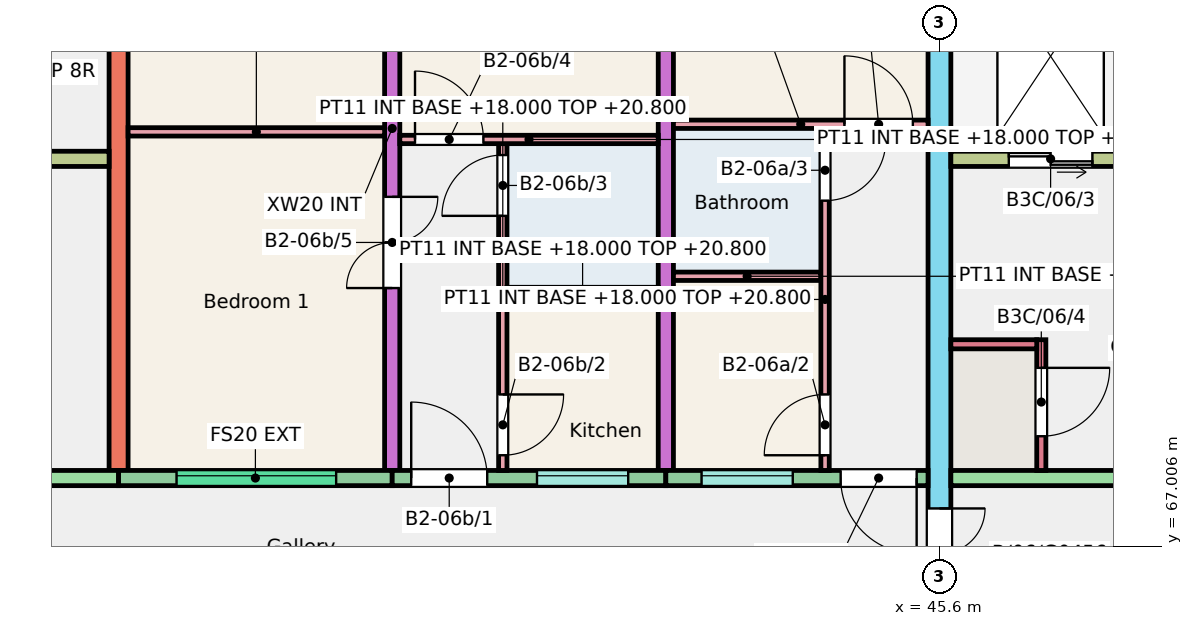
"""IFC4 building model, lengths in metres.
Left out: names, types, materials, properties, quantities, classifications, styles, units other than length and angle.
Written with IfcOpenShell. Run it as: python <this file> out.ifc"""

import sys

from ifc_helpers import new_model, si_unit, direction, frame, frame_2d, origin, place, context, subcontext, project, spatial, rectangle, extrude, element, fill, save


model = new_model("IFC4")
c1 = context("Model", 3, precision=1e-05, world=origin(), true_north=direction((0.0, 1.0)))
c2 = subcontext(c1, "Body", "Model", "MODEL_VIEW")
j1 = project(units=[si_unit("LENGTHUNIT", "METRE"), si_unit("PLANEANGLEUNIT", "RADIAN")], contexts=[c1])
p1 = place(None, origin())
s1 = spatial("IfcSite", under=j1, at=p1, CompositionType="ELEMENT")
p2 = place(p1, origin())
s2 = spatial("IfcBuilding", under=s1, at=p2, CompositionType="ELEMENT")
p3 = place(p2, frame((0.0, 0.0, 18.0)))
s3 = spatial("IfcBuildingStorey", under=s2, at=p3, CompositionType="ELEMENT", Elevation=18.0)
p4 = place(p3, frame((34.8, 68.0, 0.0), z_axis=(0.0, 0.0, 1.0), x_axis=(0.0, 1.0, 0.0)))
e1 = element("IfcWall", 1, at=p4, inside=s3, PredefinedType="SHEAR", context=c2, shape_type="SweptSolid", body=[
    extrude(rectangle(XDim=9.0, YDim=0.25, at=frame_2d((4.5, 0.0))), origin(), (0.0, 0.0, 1.0), 3.0),
])
p5 = place(p3, frame((38.4, 68.0, 0.0), z_axis=(0.0, 0.0, 1.0), x_axis=(0.0, 1.0, 0.0)))
e2 = element("IfcWall", 2, at=p5, inside=s3, PredefinedType="SHEAR", context=c2, shape_type="SweptSolid", body=[
    extrude(rectangle(XDim=9.0, YDim=0.2, at=frame_2d((4.5, 0.0))), origin(), (0.0, 0.0, 1.0), 3.0),
])
p6 = place(p5, frame((2.4, 0.0, 0.0)))
e3 = element("IfcOpeningElement", 3, at=p6, cuts=e2, PredefinedType="OPENING", context=c2, shape_type="SweptSolid", body=[
    extrude(rectangle(XDim=1.2, YDim=2.1, at=frame_2d((0.6, 1.05))), frame((0.0, 0.11, 0.0), z_axis=(0.0, -1.0, 0.0), x_axis=(1.0, 0.0, 0.0)), (0.0, 0.0, 1.0), 0.22),
])
p7 = place(p5, frame((6.4, 0.0, 0.0)))
e4 = element("IfcOpeningElement", 4, at=p7, cuts=e2, PredefinedType="OPENING", context=c2, shape_type="SweptSolid", body=[
    extrude(rectangle(XDim=1.2, YDim=2.1, at=frame_2d((0.6, 1.05))), frame((0.0, 0.11, 0.0), z_axis=(0.0, -1.0, 0.0), x_axis=(1.0, 0.0, 0.0)), (0.0, 0.0, 1.0), 0.22),
])
p8 = place(p3, frame((42.0, 68.0, 0.0), z_axis=(0.0, 0.0, 1.0), x_axis=(0.0, 1.0, 0.0)))
e5 = element("IfcWall", 5, at=p8, inside=s3, PredefinedType="SHEAR", context=c2, shape_type="SweptSolid", body=[
    extrude(rectangle(XDim=9.0, YDim=0.2, at=frame_2d((4.5, 0.0))), origin(), (0.0, 0.0, 1.0), 3.0),
])
p9 = place(p3, frame((45.6, 66.0, 0.0), z_axis=(0.0, 0.0, 1.0), x_axis=(0.0, 1.0, 0.0)))
e6 = element("IfcWall", 6, at=p9, inside=s3, PredefinedType="SHEAR", context=c2, shape_type="SweptSolid", body=[
    extrude(rectangle(XDim=11.0, YDim=0.3, at=frame_2d((5.5, 0.0))), origin(), (0.0, 0.0, 1.0), 3.0),
])
p10 = place(p9, frame((0.3, 0.0, 0.0)))
e7 = element("IfcOpeningElement", 7, at=p10, cuts=e6, PredefinedType="OPENING", context=c2, shape_type="SweptSolid", body=[
    extrude(rectangle(XDim=1.2, YDim=2.1, at=frame_2d((0.6, 1.05))), frame((0.0, 0.16, 0.0), z_axis=(0.0, -1.0, 0.0), x_axis=(1.0, 0.0, 0.0)), (0.0, 0.0, 1.0), 0.32),
])
p11 = place(p3, frame((28.95, 67.9, 0.0), z_axis=(0.0, 0.0, 1.0), x_axis=(1.0, 0.0, 0.0)))
e8 = element("IfcWall", 8, at=p11, inside=s3, PredefinedType="SHEAR", context=c2, shape_type="SweptSolid", body=[
    extrude(rectangle(XDim=5.85, YDim=0.2, at=frame_2d((2.925, 0.0))), origin(), (0.0, 0.0, 1.0), 3.0),
])
p12 = place(p11, frame((2.312, 0.0, 0.0)))
e9 = element("IfcOpeningElement", 9, at=p12, cuts=e8, PredefinedType="OPENING", context=c2, shape_type="SweptSolid", body=[
    extrude(rectangle(XDim=1.1, YDim=2.1, at=frame_2d((0.55, 1.05))), frame((0.0, 0.11, 0.0), z_axis=(0.0, -1.0, 0.0), x_axis=(1.0, 0.0, 0.0)), (0.0, 0.0, 1.0), 0.22),
])
p13 = place(p3, frame((28.95, 72.1, 0.0), z_axis=(0.0, 0.0, 1.0), x_axis=(1.0, 0.0, 0.0)))
e10 = element("IfcWall", 10, at=p13, inside=s3, PredefinedType="SHEAR", context=c2, shape_type="SweptSolid", body=[
    extrude(rectangle(XDim=5.725, YDim=0.2, at=frame_2d((2.863, 0.0))), origin(), (0.0, 0.0, 1.0), 3.0),
])
p14 = place(p13, frame((3.775, 0.0, 0.0)))
e11 = element("IfcOpeningElement", 11, at=p14, cuts=e10, PredefinedType="OPENING", context=c2, shape_type="SweptSolid", body=[
    extrude(rectangle(XDim=1.0, YDim=2.1, at=frame_2d((0.5, 1.05))), frame((0.0, 0.11, 0.0), z_axis=(0.0, -1.0, 0.0), x_axis=(1.0, 0.0, 0.0)), (0.0, 0.0, 1.0), 0.22),
])
p15 = place(p13, frame((0.762, 0.0, 0.0)))
e12 = element("IfcOpeningElement", 12, at=p15, cuts=e10, PredefinedType="OPENING", context=c2, shape_type="SweptSolid", body=[
    extrude(rectangle(XDim=1.1, YDim=2.1, at=frame_2d((0.55, 1.05))), frame((0.0, 0.11, 0.0), z_axis=(0.0, -1.0, 0.0), x_axis=(1.0, 0.0, 0.0)), (0.0, 0.0, 1.0), 0.22),
])
p16 = place(p3, frame((34.8, 67.9, 0.0), z_axis=(0.0, 0.0, 1.0), x_axis=(1.0, 0.0, 0.0)))
e13 = element("IfcWall", 13, at=p16, inside=s3, PredefinedType="SOLIDWALL", context=c2, shape_type="SweptSolid", body=[
    extrude(rectangle(XDim=3.6, YDim=0.2, at=frame_2d((1.8, 0.0))), origin(), (0.0, 0.0, 1.0), 3.0),
])
p17 = place(p16, frame((0.762, 0.0, 1.2)))
e14 = element("IfcOpeningElement", 14, at=p17, cuts=e13, PredefinedType="OPENING", context=c2, shape_type="SweptSolid", body=[
    extrude(rectangle(XDim=2.1, YDim=1.2, at=frame_2d((1.05, 0.6))), frame((0.0, 0.11, 0.0), z_axis=(0.0, -1.0, 0.0), x_axis=(1.0, 0.0, 0.0)), (0.0, 0.0, 1.0), 0.22),
])
p18 = place(p3, frame((38.4, 67.9, 0.0), z_axis=(0.0, 0.0, 1.0), x_axis=(1.0, 0.0, 0.0)))
e15 = element("IfcWall", 15, at=p18, inside=s3, PredefinedType="SOLIDWALL", context=c2, shape_type="SweptSolid", body=[
    extrude(rectangle(XDim=3.6, YDim=0.2, at=frame_2d((1.8, 0.0))), origin(), (0.0, 0.0, 1.0), 3.0),
])
p19 = place(p18, frame((1.905, 0.0, 1.1)))
e16 = element("IfcOpeningElement", 16, at=p19, cuts=e15, PredefinedType="OPENING", context=c2, shape_type="SweptSolid", body=[
    extrude(rectangle(XDim=1.2, YDim=1.3, at=frame_2d((0.6, 0.65))), frame((0.0, 0.11, 0.0), z_axis=(0.0, -1.0, 0.0), x_axis=(1.0, 0.0, 0.0)), (0.0, 0.0, 1.0), 0.22),
])
p20 = place(p18, frame((0.25, 0.0, 0.0)))
e17 = element("IfcOpeningElement", 17, at=p20, cuts=e15, PredefinedType="OPENING", context=c2, shape_type="SweptSolid", body=[
    extrude(rectangle(XDim=1.0, YDim=2.1, at=frame_2d((0.5, 1.05))), frame((0.0, 0.11, 0.0), z_axis=(0.0, -1.0, 0.0), x_axis=(1.0, 0.0, 0.0)), (0.0, 0.0, 1.0), 0.22),
])
p21 = place(p3, frame((42.0, 67.9, 0.0), z_axis=(0.0, 0.0, 1.0), x_axis=(1.0, 0.0, 0.0)))
e18 = element("IfcWall", 18, at=p21, inside=s3, PredefinedType="SOLIDWALL", context=c2, shape_type="SweptSolid", body=[
    extrude(rectangle(XDim=3.45, YDim=0.2, at=frame_2d((1.725, 0.0))), origin(), (0.0, 0.0, 1.0), 3.0),
])
p22 = place(p21, frame((0.47, 0.0, 1.1)))
e19 = element("IfcOpeningElement", 19, at=p22, cuts=e18, PredefinedType="OPENING", context=c2, shape_type="SweptSolid", body=[
    extrude(rectangle(XDim=1.2, YDim=1.3, at=frame_2d((0.6, 0.65))), frame((0.0, 0.11, 0.0), z_axis=(0.0, -1.0, 0.0), x_axis=(1.0, 0.0, 0.0)), (0.0, 0.0, 1.0), 0.22),
])
p23 = place(p21, frame((2.3, 0.0, 0.0)))
e20 = element("IfcOpeningElement", 20, at=p23, cuts=e18, PredefinedType="OPENING", context=c2, shape_type="SweptSolid", body=[
    extrude(rectangle(XDim=1.0, YDim=2.1, at=frame_2d((0.5, 1.05))), frame((0.0, 0.11, 0.0), z_axis=(0.0, -1.0, 0.0), x_axis=(1.0, 0.0, 0.0)), (0.0, 0.0, 1.0), 0.22),
])
p24 = place(p3, frame((45.75, 67.9, 0.0), z_axis=(0.0, 0.0, 1.0), x_axis=(1.0, 0.0, 0.0)))
e21 = element("IfcWall", 21, at=p24, inside=s3, PredefinedType="SHEAR", context=c2, shape_type="SweptSolid", body=[
    extrude(rectangle(XDim=5.85, YDim=0.2, at=frame_2d((2.925, 0.0))), origin(), (0.0, 0.0, 1.0), 3.0),
])
p25 = place(p24, frame((2.312, 0.0, 0.0)))
e22 = element("IfcOpeningElement", 22, at=p25, cuts=e21, PredefinedType="OPENING", context=c2, shape_type="SweptSolid", body=[
    extrude(rectangle(XDim=1.1, YDim=2.1, at=frame_2d((0.55, 1.05))), frame((0.0, 0.11, 0.0), z_axis=(0.0, -1.0, 0.0), x_axis=(1.0, 0.0, 0.0)), (0.0, 0.0, 1.0), 0.22),
])
p26 = place(p3, frame((45.75, 72.1, 0.0), z_axis=(0.0, 0.0, 1.0), x_axis=(1.0, 0.0, 0.0)))
e23 = element("IfcWall", 23, at=p26, inside=s3, PredefinedType="SHEAR", context=c2, shape_type="SweptSolid", body=[
    extrude(rectangle(XDim=5.725, YDim=0.2, at=frame_2d((2.863, 0.0))), origin(), (0.0, 0.0, 1.0), 3.0),
])
p27 = place(p26, frame((3.775, 0.0, 0.0)))
e24 = element("IfcOpeningElement", 24, at=p27, cuts=e23, PredefinedType="OPENING", context=c2, shape_type="SweptSolid", body=[
    extrude(rectangle(XDim=1.0, YDim=2.1, at=frame_2d((0.5, 1.05))), frame((0.0, 0.11, 0.0), z_axis=(0.0, -1.0, 0.0), x_axis=(1.0, 0.0, 0.0)), (0.0, 0.0, 1.0), 0.22),
])
p28 = place(p26, frame((0.762, 0.0, 0.0)))
e25 = element("IfcOpeningElement", 25, at=p28, cuts=e23, PredefinedType="OPENING", context=c2, shape_type="SweptSolid", body=[
    extrude(rectangle(XDim=1.1, YDim=2.1, at=frame_2d((0.55, 1.05))), frame((0.0, 0.11, 0.0), z_axis=(0.0, -1.0, 0.0), x_axis=(1.0, 0.0, 0.0)), (0.0, 0.0, 1.0), 0.22),
])
p29 = place(p3, frame((46.94, 68.0, 0.0), z_axis=(0.0, 0.0, 1.0), x_axis=(0.0, 1.0, 0.0)))
e26 = element("IfcWall", 26, at=p29, inside=s3, PredefinedType="SHEAR", context=c2, shape_type="SweptSolid", body=[
    extrude(rectangle(XDim=1.72, YDim=0.12, at=frame_2d((0.86, 0.0))), origin(), (0.0, 0.0, 1.0), 3.0),
])
p30 = place(p29, frame((0.45, 0.0, 0.0)))
e27 = element("IfcOpeningElement", 27, at=p30, cuts=e26, PredefinedType="OPENING", context=c2, shape_type="SweptSolid", body=[
    extrude(rectangle(XDim=0.9, YDim=2.1, at=frame_2d((0.45, 1.05))), frame((0.0, 0.07, 0.0), z_axis=(0.0, -1.0, 0.0), x_axis=(1.0, 0.0, 0.0)), (0.0, 0.0, 1.0), 0.14),
])
p31 = place(p3, frame((45.75, 69.66, 0.0), z_axis=(0.0, 0.0, 1.0), x_axis=(1.0, 0.0, 0.0)))
e28 = element("IfcWall", 28, at=p31, inside=s3, PredefinedType="SHEAR", context=c2, shape_type="SweptSolid", body=[
    extrude(rectangle(XDim=1.13, YDim=0.12, at=frame_2d((0.565, 0.0))), origin(), (0.0, 0.0, 1.0), 3.0),
])
p32 = place(p3, frame((42.1, 70.555, 0.0), z_axis=(0.0, 0.0, 1.0), x_axis=(1.0, 0.0, 0.0)))
e29 = element("IfcWall", 29, at=p32, inside=s3, PredefinedType="PARTITIONING", context=c2, shape_type="SweptSolid", body=[
    extrude(rectangle(XDim=1.94, YDim=0.11, at=frame_2d((0.97, 0.0))), origin(), (0.0, 0.0, 1.0), 2.8),
])
p33 = place(p3, frame((44.095, 68.0, 0.0), z_axis=(0.0, 0.0, 1.0), x_axis=(0.0, 1.0, 0.0)))
e30 = element("IfcWall", 30, at=p33, inside=s3, PredefinedType="PARTITIONING", context=c2, shape_type="SweptSolid", body=[
    extrude(rectangle(XDim=4.5, YDim=0.11, at=frame_2d((2.25, 0.0))), origin(), (0.0, 0.0, 1.0), 2.8),
])
p34 = place(p33, frame((0.2, 0.0, 0.0)))
e31 = element("IfcOpeningElement", 31, at=p34, cuts=e30, PredefinedType="OPENING", context=c2, shape_type="SweptSolid", body=[
    extrude(rectangle(XDim=0.8, YDim=2.1, at=frame_2d((0.4, 1.05))), frame((0.0, 0.065, 0.0), z_axis=(0.0, -1.0, 0.0), x_axis=(1.0, 0.0, 0.0)), (0.0, 0.0, 1.0), 0.13),
])
p35 = place(p33, frame((3.55, 0.0, 0.0)))
e32 = element("IfcOpeningElement", 32, at=p35, cuts=e30, PredefinedType="OPENING", context=c2, shape_type="SweptSolid", body=[
    extrude(rectangle(XDim=0.8, YDim=2.1, at=frame_2d((0.4, 1.05))), frame((0.0, 0.065, 0.0), z_axis=(0.0, -1.0, 0.0), x_axis=(1.0, 0.0, 0.0)), (0.0, 0.0, 1.0), 0.13),
])
p36 = place(p3, frame((42.1, 72.555, 0.0), z_axis=(0.0, 0.0, 1.0), x_axis=(1.0, 0.0, 0.0)))
e33 = element("IfcWall", 33, at=p36, inside=s3, PredefinedType="PARTITIONING", context=c2, shape_type="SweptSolid", body=[
    extrude(rectangle(XDim=3.35, YDim=0.11, at=frame_2d((1.675, 0.0))), origin(), (0.0, 0.0, 1.0), 2.8),
])
p37 = place(p36, frame((2.25, 0.0, 0.0)))
e34 = element("IfcOpeningElement", 34, at=p37, cuts=e33, PredefinedType="OPENING", context=c2, shape_type="SweptSolid", body=[
    extrude(rectangle(XDim=0.9, YDim=2.1, at=frame_2d((0.45, 1.05))), frame((0.0, 0.065, 0.0), z_axis=(0.0, -1.0, 0.0), x_axis=(1.0, 0.0, 0.0)), (0.0, 0.0, 1.0), 0.13),
])
p38 = place(p3, frame((39.855, 68.0, 0.0), z_axis=(0.0, 0.0, 1.0), x_axis=(0.0, 1.0, 0.0)))
e35 = element("IfcWall", 35, at=p38, inside=s3, PredefinedType="PARTITIONING", context=c2, shape_type="SweptSolid", body=[
    extrude(rectangle(XDim=4.3, YDim=0.11, at=frame_2d((2.15, 0.0))), origin(), (0.0, 0.0, 1.0), 2.8),
])
p39 = place(p38, frame((0.2, 0.0, 0.0)))
e36 = element("IfcOpeningElement", 36, at=p39, cuts=e35, PredefinedType="OPENING", context=c2, shape_type="SweptSolid", body=[
    extrude(rectangle(XDim=0.8, YDim=2.1, at=frame_2d((0.4, 1.05))), frame((0.0, 0.065, 0.0), z_axis=(0.0, -1.0, 0.0), x_axis=(1.0, 0.0, 0.0)), (0.0, 0.0, 1.0), 0.13),
])
p40 = place(p38, frame((3.35, 0.0, 0.0)))
e37 = element("IfcOpeningElement", 37, at=p40, cuts=e35, PredefinedType="OPENING", context=c2, shape_type="SweptSolid", body=[
    extrude(rectangle(XDim=0.8, YDim=2.1, at=frame_2d((0.4, 1.05))), frame((0.0, 0.065, 0.0), z_axis=(0.0, -1.0, 0.0), x_axis=(1.0, 0.0, 0.0)), (0.0, 0.0, 1.0), 0.13),
])
p41 = place(p3, frame((39.91, 70.355, 0.0), z_axis=(0.0, 0.0, 1.0), x_axis=(1.0, 0.0, 0.0)))
e38 = element("IfcWall", 38, at=p41, inside=s3, PredefinedType="PARTITIONING", context=c2, shape_type="SweptSolid", body=[
    extrude(rectangle(XDim=1.99, YDim=0.11, at=frame_2d((0.995, 0.0))), origin(), (0.0, 0.0, 1.0), 2.8),
])
p42 = place(p3, frame((38.5, 72.355, 0.0), z_axis=(0.0, 0.0, 1.0), x_axis=(1.0, 0.0, 0.0)))
e39 = element("IfcWall", 39, at=p42, inside=s3, PredefinedType="PARTITIONING", context=c2, shape_type="SweptSolid", body=[
    extrude(rectangle(XDim=3.4, YDim=0.11, at=frame_2d((1.7, 0.0))), origin(), (0.0, 0.0, 1.0), 2.8),
])
p43 = place(p42, frame((0.2, 0.0, 0.0)))
e40 = element("IfcOpeningElement", 40, at=p43, cuts=e39, PredefinedType="OPENING", context=c2, shape_type="SweptSolid", body=[
    extrude(rectangle(XDim=0.9, YDim=2.1, at=frame_2d((0.45, 1.05))), frame((0.0, 0.065, 0.0), z_axis=(0.0, -1.0, 0.0), x_axis=(1.0, 0.0, 0.0)), (0.0, 0.0, 1.0), 0.13),
])
p44 = place(p3, frame((34.925, 72.455, 0.0), z_axis=(0.0, 0.0, 1.0), x_axis=(1.0, 0.0, 0.0)))
e41 = element("IfcWall", 41, at=p44, inside=s3, PredefinedType="PARTITIONING", context=c2, shape_type="SweptSolid", body=[
    extrude(rectangle(XDim=3.375, YDim=0.11, at=frame_2d((1.688, 0.0))), origin(), (0.0, 0.0, 1.0), 2.8),
])
p45 = place(p22, origin())
e42 = element("IfcWindow", 42, at=p45, inside=s3, PartitioningType="SINGLE_PANEL", PredefinedType="WINDOW", context=c2, shape_type="SweptSolid", body=[
    extrude(rectangle(XDim=1.2, YDim=1.3, at=frame_2d((0.6, 0.65))), frame((0.0, 0.06, 0.0), z_axis=(0.0, -1.0, 0.0), x_axis=(1.0, 0.0, 0.0)), (0.0, 0.0, 1.0), 0.06),
])
fill(e19, e42)
p46 = place(p17, origin())
e43 = element("IfcWindow", 43, at=p46, inside=s3, PartitioningType="SINGLE_PANEL", PredefinedType="WINDOW", context=c2, shape_type="SweptSolid", body=[
    extrude(rectangle(XDim=2.1, YDim=1.2, at=frame_2d((1.05, 0.6))), frame((0.0, 0.06, 0.0), z_axis=(0.0, -1.0, 0.0), x_axis=(1.0, 0.0, 0.0)), (0.0, 0.0, 1.0), 0.06),
])
fill(e14, e43)
p47 = place(p19, origin())
e44 = element("IfcWindow", 44, at=p47, inside=s3, PartitioningType="SINGLE_PANEL", PredefinedType="WINDOW", context=c2, shape_type="SweptSolid", body=[
    extrude(rectangle(XDim=1.2, YDim=1.3, at=frame_2d((0.6, 0.65))), frame((0.0, 0.06, 0.0), z_axis=(0.0, -1.0, 0.0), x_axis=(1.0, 0.0, 0.0)), (0.0, 0.0, 1.0), 0.06),
])
fill(e16, e44)
p48 = place(p23, origin())
e45 = element("IfcDoor", 45, at=p48, inside=s3, OperationType="SINGLE_SWING_RIGHT", PredefinedType="DOOR", context=c2, shape_type="SweptSolid", body=[
    extrude(rectangle(XDim=1.0, YDim=2.1, at=frame_2d((0.5, 1.05))), frame((0.0, 0.025, 0.0), z_axis=(0.0, -1.0, 0.0), x_axis=(1.0, 0.0, 0.0)), (0.0, 0.0, 1.0), 0.05),
])
fill(e20, e45)
p49 = place(p34, origin())
e46 = element("IfcDoor", 46, at=p49, inside=s3, OperationType="SINGLE_SWING_LEFT", PredefinedType="DOOR", context=c2, shape_type="SweptSolid", body=[
    extrude(rectangle(XDim=0.8, YDim=2.1, at=frame_2d((0.4, 1.05))), frame((0.0, 0.025, 0.0), z_axis=(0.0, -1.0, 0.0), x_axis=(1.0, 0.0, 0.0)), (0.0, 0.0, 1.0), 0.05),
])
fill(e31, e46)
p50 = place(p35, origin())
e47 = element("IfcDoor", 47, at=p50, inside=s3, OperationType="SINGLE_SWING_RIGHT", PredefinedType="DOOR", context=c2, shape_type="SweptSolid", body=[
    extrude(rectangle(XDim=0.8, YDim=2.1, at=frame_2d((0.4, 1.05))), frame((0.0, 0.025, 0.0), z_axis=(0.0, -1.0, 0.0), x_axis=(1.0, 0.0, 0.0)), (0.0, 0.0, 1.0), 0.05),
])
fill(e32, e47)
p51 = place(p37, origin())
e48 = element("IfcDoor", 48, at=p51, inside=s3, OperationType="SINGLE_SWING_LEFT", PredefinedType="DOOR", context=c2, shape_type="SweptSolid", body=[
    extrude(rectangle(XDim=0.9, YDim=2.1, at=frame_2d((0.45, 1.05))), frame((0.0, 0.025, 0.0), z_axis=(0.0, -1.0, 0.0), x_axis=(1.0, 0.0, 0.0)), (0.0, 0.0, 1.0), 0.05),
])
fill(e34, e48)
p52 = place(p20, origin())
e49 = element("IfcDoor", 49, at=p52, inside=s3, OperationType="SINGLE_SWING_LEFT", PredefinedType="DOOR", context=c2, shape_type="SweptSolid", body=[
    extrude(rectangle(XDim=1.0, YDim=2.1, at=frame_2d((0.5, 1.05))), frame((0.0, 0.025, 0.0), z_axis=(0.0, -1.0, 0.0), x_axis=(1.0, 0.0, 0.0)), (0.0, 0.0, 1.0), 0.05),
])
fill(e17, e49)
p53 = place(p39, origin())
e50 = element("IfcDoor", 50, at=p53, inside=s3, OperationType="SINGLE_SWING_RIGHT", PredefinedType="DOOR", context=c2, shape_type="SweptSolid", body=[
    extrude(rectangle(XDim=0.8, YDim=2.1, at=frame_2d((0.4, 1.05))), frame((0.0, 0.025, 0.0), z_axis=(0.0, -1.0, 0.0), x_axis=(1.0, 0.0, 0.0)), (0.0, 0.0, 1.0), 0.05),
])
fill(e36, e50)
p54 = place(p40, origin())
e51 = element("IfcDoor", 51, at=p54, inside=s3, OperationType="SINGLE_SWING_LEFT", PredefinedType="DOOR", context=c2, shape_type="SweptSolid", body=[
    extrude(rectangle(XDim=0.8, YDim=2.1, at=frame_2d((0.4, 1.05))), frame((0.0, 0.025, 0.0), z_axis=(0.0, -1.0, 0.0), x_axis=(1.0, 0.0, 0.0)), (0.0, 0.0, 1.0), 0.05),
])
fill(e37, e51)
p55 = place(p43, origin())
e52 = element("IfcDoor", 52, at=p55, inside=s3, OperationType="SINGLE_SWING_LEFT", PredefinedType="DOOR", context=c2, shape_type="SweptSolid", body=[
    extrude(rectangle(XDim=0.9, YDim=2.1, at=frame_2d((0.45, 1.05))), frame((0.0, 0.025, 0.0), z_axis=(0.0, -1.0, 0.0), x_axis=(1.0, 0.0, 0.0)), (0.0, 0.0, 1.0), 0.05),
])
fill(e40, e52)
p56 = place(p6, origin())
e53 = element("IfcDoor", 53, at=p56, inside=s3, OperationType="DOUBLE_DOOR_SINGLE_SWING", PredefinedType="DOOR", context=c2, shape_type="SweptSolid", body=[
    extrude(rectangle(XDim=1.2, YDim=2.1, at=frame_2d((0.6, 1.05))), frame((0.0, 0.025, 0.0), z_axis=(0.0, -1.0, 0.0), x_axis=(1.0, 0.0, 0.0)), (0.0, 0.0, 1.0), 0.05),
])
fill(e3, e53)
p57 = place(p28, origin())
e54 = element("IfcDoor", 54, at=p57, inside=s3, OperationType="DOUBLE_DOOR_SLIDING", PredefinedType="DOOR", context=c2, shape_type="SweptSolid", body=[
    extrude(rectangle(XDim=1.1, YDim=2.1, at=frame_2d((0.55, 1.05))), frame((0.0, 0.025, 0.0), z_axis=(0.0, -1.0, 0.0), x_axis=(1.0, 0.0, 0.0)), (0.0, 0.0, 1.0), 0.05),
])
fill(e25, e54)
p58 = place(p30, origin())
e55 = element("IfcDoor", 55, at=p58, inside=s3, OperationType="SINGLE_SWING_RIGHT", PredefinedType="DOOR", context=c2, shape_type="SweptSolid", body=[
    extrude(rectangle(XDim=0.9, YDim=2.1, at=frame_2d((0.45, 1.05))), frame((0.0, 0.025, 0.0), z_axis=(0.0, -1.0, 0.0), x_axis=(1.0, 0.0, 0.0)), (0.0, 0.0, 1.0), 0.05),
])
fill(e27, e55)
p59 = place(p10, origin())
e56 = element("IfcDoor", 56, at=p59, inside=s3, OperationType="DOUBLE_DOOR_SINGLE_SWING", PredefinedType="DOOR", context=c2, shape_type="SweptSolid", body=[
    extrude(rectangle(XDim=1.2, YDim=2.1, at=frame_2d((0.6, 1.05))), frame((0.0, 0.025, 0.0), z_axis=(0.0, -1.0, 0.0), x_axis=(1.0, 0.0, 0.0)), (0.0, 0.0, 1.0), 0.05),
])
fill(e7, e56)
save(model, sys.argv[1])
